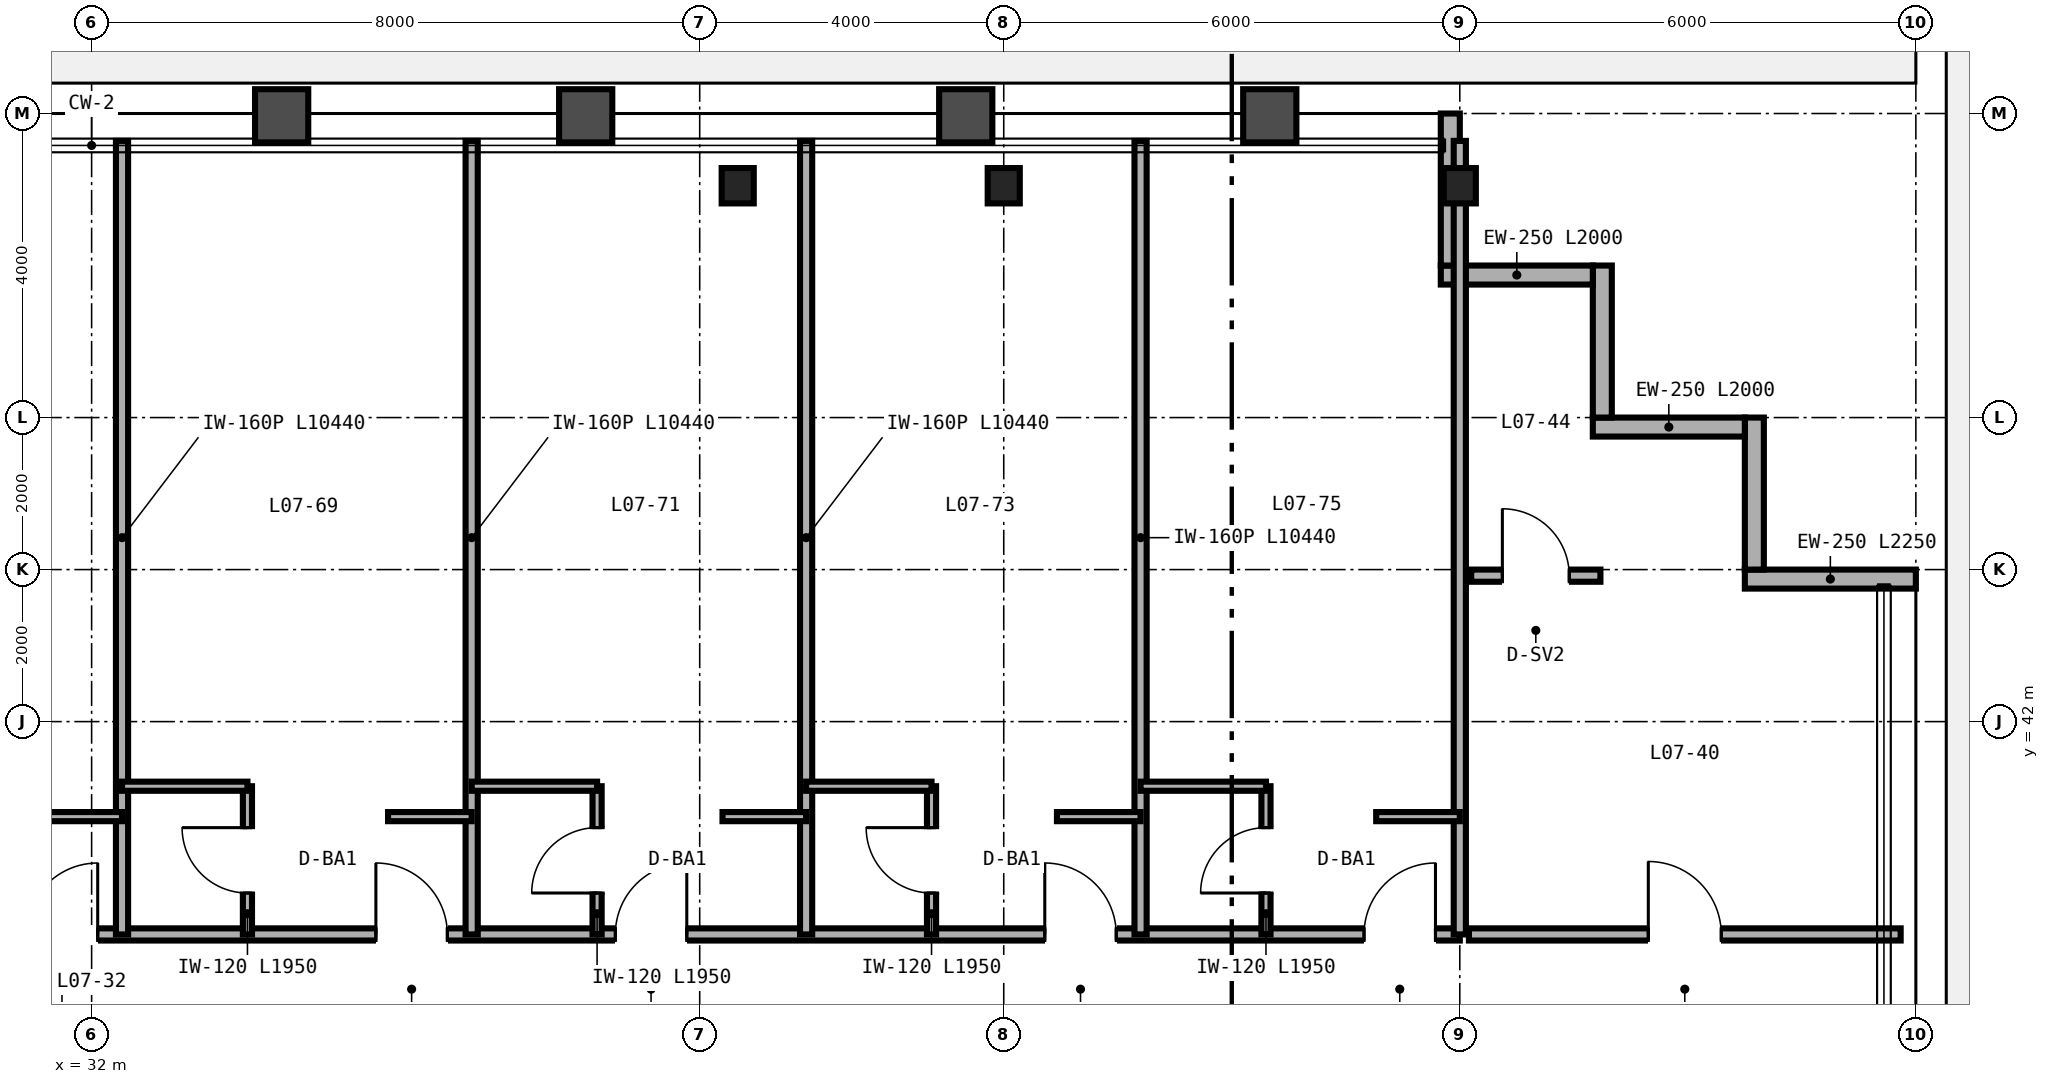
"""IFC4 building model, lengths in metres.
Left out: names, types, materials, properties, quantities, classifications, styles, units other than length and angle.
Written with IfcOpenShell. Run it as: python <this file> out.ifc"""

import sys

from ifc_helpers import new_model, si_unit, direction, frame, frame_2d, origin, origin_2d, place, context, subcontext, project, spatial, rectangle, i_section, extrude, source, transform, mapped, element, fill, save


model = new_model("IFC4")
c1 = context("Model", 3, precision=1e-05, world=origin(), true_north=direction((0.0, 1.0)))
c2 = subcontext(c1, "Body", "Model", "MODEL_VIEW")
j1 = project(units=[si_unit("LENGTHUNIT", "METRE"), si_unit("PLANEANGLEUNIT", "RADIAN")], contexts=[c1])
p1 = place(None, origin())
s1 = spatial("IfcSite", under=j1, at=p1, CompositionType="ELEMENT")
p2 = place(p1, origin())
s2 = spatial("IfcBuilding", under=s1, at=p2, CompositionType="ELEMENT")
p3 = place(p2, frame((0.0, 0.0, 34.8)))
s3 = spatial("IfcBuildingStorey", under=s2, at=p3, CompositionType="ELEMENT", Elevation=34.8)
m1 = source(origin(), c2, "Body", "SweptSolid", [
    extrude(i_section(OverallWidth=0.422, OverallDepth=0.465, WebThickness=0.045, FlangeThickness=0.073, FilletRadius=0.025, at=origin_2d()), origin(), (0.0, 0.0, 1.0), 3.35),
])
for number, where, z_axis, x_axis in (
    (1, (40.5, 49.05, 0.0), (0.0, 0.0, 1.0), (1.0, 0.0, 0.0)),
    (2, (44.0, 49.05, 0.0), (0.0, 0.0, 1.0), (1.0, 0.0, 0.0)),
    (3, (50.0, 49.05, 0.0), (0.0, 0.0, 1.0), (1.0, 0.0, 0.0)),
):
    element("IfcColumn", number, at=place(p3, frame(where, z_axis=z_axis, x_axis=x_axis)), inside=s3, PredefinedType="COLUMN", context=c2, shape_type="MappedRepresentation", body=[
        mapped(m1, transform((0.0, 0.0, 0.0), scale=1.0)),
    ])
p4 = place(p3, frame((56.0, 43.875, 0.0), z_axis=(0.0, 0.0, 1.0), x_axis=(-1.0, 0.0, 0.0)))
e4 = element("IfcWall", 4, at=p4, inside=s3, PredefinedType="SOLIDWALL", context=c2, shape_type="SweptSolid", body=[
    extrude(rectangle(XDim=2.25, YDim=0.25, at=frame_2d((1.125, 0.0))), origin(), (0.0, 0.0, 1.0), 3.35),
])
for number, where, z_axis, x_axis in (
    (5, (53.875, 44.0, 0.0), (0.0, 0.0, 1.0), (0.0, 1.0, 0.0)),
    (6, (53.75, 45.875, 0.0), (0.0, 0.0, 1.0), (-1.0, 0.0, 0.0)),
    (7, (51.875, 46.0, 0.0), (0.0, 0.0, 1.0), (0.0, 1.0, 0.0)),
    (8, (51.75, 47.875, 0.0), (0.0, 0.0, 1.0), (-1.0, 0.0, 0.0)),
):
    element("IfcWall", number, at=place(p3, frame(where, z_axis=z_axis, x_axis=x_axis)), inside=s3, PredefinedType="SOLIDWALL", context=c2, shape_type="SweptSolid", body=[
        extrude(rectangle(XDim=2.0, YDim=0.25, at=frame_2d((1.0, 0.0))), origin(), (0.0, 0.0, 1.0), 3.35),
    ])
p5 = place(p3, frame((49.875, 48.0, 0.0), z_axis=(0.0, 0.0, 1.0), x_axis=(0.0, 1.0, 0.0)))
e9 = element("IfcWall", 9, at=p5, inside=s3, PredefinedType="SOLIDWALL", context=c2, shape_type="SweptSolid", body=[
    extrude(rectangle(XDim=2.0, YDim=0.25, at=frame_2d((1.0, 0.0))), origin(), (0.0, 0.0, 1.0), 2.657),
])
p6 = place(p3, frame((50.12, 39.2, 0.0), z_axis=(0.0, 0.0, 1.0), x_axis=(1.0, 0.0, 0.0)))
e10 = element("IfcWall", 10, at=p6, inside=s3, PredefinedType="PARTITIONING", context=c2, shape_type="SweptSolid", body=[
    extrude(rectangle(XDim=5.68, YDim=0.16, at=frame_2d((2.84, 0.0))), origin(), (0.0, 0.0, 1.0), 3.35),
])
p7 = place(p6, frame((2.36, 0.0, 0.0)))
e11 = element("IfcOpeningElement", 11, at=p7, cuts=e10, PredefinedType="OPENING", context=c2, shape_type="SweptSolid", body=[
    extrude(rectangle(XDim=0.96, YDim=2.15, at=frame_2d((0.48, 1.075))), frame((0.0, 0.09, 0.0), z_axis=(0.0, -1.0, 0.0), x_axis=(1.0, 0.0, 0.0)), (0.0, 0.0, 1.0), 0.18),
])
p8 = place(p3, frame((50.15, 43.92, 0.0), z_axis=(0.0, 0.0, 1.0), x_axis=(1.0, 0.0, 0.0)))
e12 = element("IfcWall", 12, at=p8, inside=s3, PredefinedType="PARTITIONING", context=c2, shape_type="SweptSolid", body=[
    extrude(rectangle(XDim=1.7, YDim=0.16, at=frame_2d((0.85, 0.0))), origin(), (0.0, 0.0, 1.0), 3.35),
])
p9 = place(p8, frame((0.41, 0.0, 0.0)))
e13 = element("IfcOpeningElement", 13, at=p9, cuts=e12, PredefinedType="OPENING", context=c2, shape_type="SweptSolid", body=[
    extrude(rectangle(XDim=0.88, YDim=2.15, at=frame_2d((0.44, 1.075))), frame((0.0, 0.09, 0.0), z_axis=(0.0, -1.0, 0.0), x_axis=(1.0, 0.0, 0.0)), (0.0, 0.0, 1.0), 0.18),
])
p10 = place(p3, frame((14.0, 39.2, 0.0), z_axis=(0.0, 0.0, 1.0), x_axis=(1.0, 0.0, 0.0)))
e14 = element("IfcWall", 14, at=p10, inside=s3, PredefinedType="PARTITIONING", context=c2, shape_type="SweptSolid", body=[
    extrude(rectangle(XDim=36.0, YDim=0.16, at=frame_2d((18.0, 0.0))), origin(), (0.0, 0.0, 1.0), 2.571),
])
p11 = place(p10, frame((3.34, 0.0, 0.0)))
e15 = element("IfcOpeningElement", 15, at=p11, cuts=e14, PredefinedType="OPENING", context=c2, shape_type="SweptSolid", body=[
    extrude(rectangle(XDim=0.94, YDim=2.15, at=frame_2d((0.47, 1.075))), frame((0.0, 0.09, 0.0), z_axis=(0.0, -1.0, 0.0), x_axis=(1.0, 0.0, 0.0)), (0.0, 0.0, 1.0), 0.18),
])
p12 = place(p10, frame((7.79, 0.0, 0.0)))
e16 = element("IfcOpeningElement", 16, at=p12, cuts=e14, PredefinedType="OPENING", context=c2, shape_type="SweptSolid", body=[
    extrude(rectangle(XDim=0.94, YDim=2.15, at=frame_2d((0.47, 1.075))), frame((0.0, 0.09, 0.0), z_axis=(0.0, -1.0, 0.0), x_axis=(1.0, 0.0, 0.0)), (0.0, 0.0, 1.0), 0.18),
])
p13 = place(p10, frame((12.54, 0.0, 0.0)))
e17 = element("IfcOpeningElement", 17, at=p13, cuts=e14, PredefinedType="OPENING", context=c2, shape_type="SweptSolid", body=[
    extrude(rectangle(XDim=0.94, YDim=2.15, at=frame_2d((0.47, 1.075))), frame((0.0, 0.09, 0.0), z_axis=(0.0, -1.0, 0.0), x_axis=(1.0, 0.0, 0.0)), (0.0, 0.0, 1.0), 0.18),
])
p14 = place(p10, frame((17.14, 0.0, 0.0)))
e18 = element("IfcOpeningElement", 18, at=p14, cuts=e14, PredefinedType="OPENING", context=c2, shape_type="SweptSolid", body=[
    extrude(rectangle(XDim=0.94, YDim=2.15, at=frame_2d((0.47, 1.075))), frame((0.0, 0.09, 0.0), z_axis=(0.0, -1.0, 0.0), x_axis=(1.0, 0.0, 0.0)), (0.0, 0.0, 1.0), 0.18),
])
p15 = place(p10, frame((21.74, 0.0, 0.0)))
e19 = element("IfcOpeningElement", 19, at=p15, cuts=e14, PredefinedType="OPENING", context=c2, shape_type="SweptSolid", body=[
    extrude(rectangle(XDim=0.94, YDim=2.15, at=frame_2d((0.47, 1.075))), frame((0.0, 0.09, 0.0), z_axis=(0.0, -1.0, 0.0), x_axis=(1.0, 0.0, 0.0)), (0.0, 0.0, 1.0), 0.18),
])
p16 = place(p10, frame((24.89, 0.0, 0.0)))
e20 = element("IfcOpeningElement", 20, at=p16, cuts=e14, PredefinedType="OPENING", context=c2, shape_type="SweptSolid", body=[
    extrude(rectangle(XDim=0.94, YDim=2.15, at=frame_2d((0.47, 1.075))), frame((0.0, 0.09, 0.0), z_axis=(0.0, -1.0, 0.0), x_axis=(1.0, 0.0, 0.0)), (0.0, 0.0, 1.0), 0.18),
])
p17 = place(p10, frame((30.54, 0.0, 0.0)))
e21 = element("IfcOpeningElement", 21, at=p17, cuts=e14, PredefinedType="OPENING", context=c2, shape_type="SweptSolid", body=[
    extrude(rectangle(XDim=0.94, YDim=2.15, at=frame_2d((0.47, 1.075))), frame((0.0, 0.09, 0.0), z_axis=(0.0, -1.0, 0.0), x_axis=(1.0, 0.0, 0.0)), (0.0, 0.0, 1.0), 0.18),
])
p18 = place(p10, frame((34.74, 0.0, 0.0)))
e22 = element("IfcOpeningElement", 22, at=p18, cuts=e14, PredefinedType="OPENING", context=c2, shape_type="SweptSolid", body=[
    extrude(rectangle(XDim=0.94, YDim=2.15, at=frame_2d((0.47, 1.075))), frame((0.0, 0.09, 0.0), z_axis=(0.0, -1.0, 0.0), x_axis=(1.0, 0.0, 0.0)), (0.0, 0.0, 1.0), 0.18),
])
p19 = place(p3, frame((50.0, 39.2, 0.0), z_axis=(0.0, 0.0, 1.0), x_axis=(0.0, 1.0, 0.0)))
e23 = element("IfcWall", 23, at=p19, inside=s3, PredefinedType="PARTITIONING", context=c2, shape_type="SweptSolid", body=[
    extrude(rectangle(XDim=10.44, YDim=0.16, at=frame_2d((5.22, 0.0))), origin(), (0.0, 0.0, 1.0), 2.657),
])
p20 = place(p3, frame((32.4, 39.2, 0.0), z_axis=(0.0, 0.0, 1.0), x_axis=(0.0, 1.0, 0.0)))
e24 = element("IfcWall", 24, at=p20, inside=s3, PredefinedType="PARTITIONING", context=c2, shape_type="SweptSolid", body=[
    extrude(rectangle(XDim=10.44, YDim=0.16, at=frame_2d((5.22, 0.0))), origin(), (0.0, 0.0, 1.0), 2.423),
])
p21 = place(p3, frame((31.3, 40.75, 0.0), z_axis=(0.0, 0.0, 1.0), x_axis=(1.0, 0.0, 0.0)))
e25 = element("IfcWall", 25, at=p21, inside=s3, PredefinedType="PARTITIONING", context=c2, shape_type="SweptSolid", body=[
    extrude(rectangle(XDim=1.1, YDim=0.12, at=frame_2d((0.55, 0.0))), origin(), (0.0, 0.0, 1.0), 3.35),
])
p22 = place(p3, frame((37.0, 39.2, 0.0), z_axis=(0.0, 0.0, 1.0), x_axis=(0.0, 1.0, 0.0)))
e26 = element("IfcWall", 26, at=p22, inside=s3, PredefinedType="PARTITIONING", context=c2, shape_type="SweptSolid", body=[
    extrude(rectangle(XDim=10.44, YDim=0.16, at=frame_2d((5.22, 0.0))), origin(), (0.0, 0.0, 1.0), 2.423),
])
p23 = place(p3, frame((34.05, 39.2, 0.0), z_axis=(0.0, 0.0, 1.0), x_axis=(0.0, 1.0, 0.0)))
e27 = element("IfcWall", 27, at=p23, inside=s3, PredefinedType="PARTITIONING", context=c2, shape_type="SweptSolid", body=[
    extrude(rectangle(XDim=1.95, YDim=0.12, at=frame_2d((0.975, 0.0))), origin(), (0.0, 0.0, 1.0), 3.35),
])
p24 = place(p23, frame((0.545, 0.0, 0.0)))
e28 = element("IfcOpeningElement", 28, at=p24, cuts=e27, PredefinedType="OPENING", context=c2, shape_type="SweptSolid", body=[
    extrude(rectangle(XDim=0.86, YDim=2.1, at=frame_2d((0.43, 1.05))), frame((0.0, 0.07, 0.0), z_axis=(0.0, -1.0, 0.0), x_axis=(1.0, 0.0, 0.0)), (0.0, 0.0, 1.0), 0.14),
])
p25 = place(p3, frame((32.4, 41.15, 0.0), z_axis=(0.0, 0.0, 1.0), x_axis=(1.0, 0.0, 0.0)))
e29 = element("IfcWall", 29, at=p25, inside=s3, PredefinedType="PARTITIONING", context=c2, shape_type="SweptSolid", body=[
    extrude(rectangle(XDim=1.65, YDim=0.12, at=frame_2d((0.825, 0.0))), origin(), (0.0, 0.0, 1.0), 3.35),
])
p26 = place(p3, frame((35.9, 40.75, 0.0), z_axis=(0.0, 0.0, 1.0), x_axis=(1.0, 0.0, 0.0)))
e30 = element("IfcWall", 30, at=p26, inside=s3, PredefinedType="PARTITIONING", context=c2, shape_type="SweptSolid", body=[
    extrude(rectangle(XDim=1.1, YDim=0.12, at=frame_2d((0.55, 0.0))), origin(), (0.0, 0.0, 1.0), 3.35),
])
p27 = place(p3, frame((41.4, 39.2, 0.0), z_axis=(0.0, 0.0, 1.0), x_axis=(0.0, 1.0, 0.0)))
e31 = element("IfcWall", 31, at=p27, inside=s3, PredefinedType="PARTITIONING", context=c2, shape_type="SweptSolid", body=[
    extrude(rectangle(XDim=10.44, YDim=0.16, at=frame_2d((5.22, 0.0))), origin(), (0.0, 0.0, 1.0), 2.813),
])
p28 = place(p3, frame((38.65, 39.2, 0.0), z_axis=(0.0, 0.0, 1.0), x_axis=(0.0, 1.0, 0.0)))
e32 = element("IfcWall", 32, at=p28, inside=s3, PredefinedType="PARTITIONING", context=c2, shape_type="SweptSolid", body=[
    extrude(rectangle(XDim=1.95, YDim=0.12, at=frame_2d((0.975, 0.0))), origin(), (0.0, 0.0, 1.0), 3.35),
])
p29 = place(p28, frame((0.545, 0.0, 0.0)))
e33 = element("IfcOpeningElement", 33, at=p29, cuts=e32, PredefinedType="OPENING", context=c2, shape_type="SweptSolid", body=[
    extrude(rectangle(XDim=0.86, YDim=2.1, at=frame_2d((0.43, 1.05))), frame((0.0, 0.07, 0.0), z_axis=(0.0, -1.0, 0.0), x_axis=(1.0, 0.0, 0.0)), (0.0, 0.0, 1.0), 0.14),
])
p30 = place(p3, frame((37.0, 41.15, 0.0), z_axis=(0.0, 0.0, 1.0), x_axis=(1.0, 0.0, 0.0)))
e34 = element("IfcWall", 34, at=p30, inside=s3, PredefinedType="PARTITIONING", context=c2, shape_type="SweptSolid", body=[
    extrude(rectangle(XDim=1.65, YDim=0.12, at=frame_2d((0.825, 0.0))), origin(), (0.0, 0.0, 1.0), 3.35),
])
p31 = place(p3, frame((40.3, 40.75, 0.0), z_axis=(0.0, 0.0, 1.0), x_axis=(1.0, 0.0, 0.0)))
e35 = element("IfcWall", 35, at=p31, inside=s3, PredefinedType="PARTITIONING", context=c2, shape_type="SweptSolid", body=[
    extrude(rectangle(XDim=1.1, YDim=0.12, at=frame_2d((0.55, 0.0))), origin(), (0.0, 0.0, 1.0), 2.571),
])
p32 = place(p3, frame((45.8, 39.2, 0.0), z_axis=(0.0, 0.0, 1.0), x_axis=(0.0, 1.0, 0.0)))
e36 = element("IfcWall", 36, at=p32, inside=s3, PredefinedType="PARTITIONING", context=c2, shape_type="SweptSolid", body=[
    extrude(rectangle(XDim=10.44, YDim=0.16, at=frame_2d((5.22, 0.0))), origin(), (0.0, 0.0, 1.0), 2.657),
])
p33 = place(p3, frame((43.05, 39.2, 0.0), z_axis=(0.0, 0.0, 1.0), x_axis=(0.0, 1.0, 0.0)))
e37 = element("IfcWall", 37, at=p33, inside=s3, PredefinedType="PARTITIONING", context=c2, shape_type="SweptSolid", body=[
    extrude(rectangle(XDim=1.95, YDim=0.12, at=frame_2d((0.975, 0.0))), origin(), (0.0, 0.0, 1.0), 3.35),
])
p34 = place(p33, frame((0.545, 0.0, 0.0)))
e38 = element("IfcOpeningElement", 38, at=p34, cuts=e37, PredefinedType="OPENING", context=c2, shape_type="SweptSolid", body=[
    extrude(rectangle(XDim=0.86, YDim=2.1, at=frame_2d((0.43, 1.05))), frame((0.0, 0.07, 0.0), z_axis=(0.0, -1.0, 0.0), x_axis=(1.0, 0.0, 0.0)), (0.0, 0.0, 1.0), 0.14),
])
p35 = place(p3, frame((41.4, 41.15, 0.0), z_axis=(0.0, 0.0, 1.0), x_axis=(1.0, 0.0, 0.0)))
e39 = element("IfcWall", 39, at=p35, inside=s3, PredefinedType="PARTITIONING", context=c2, shape_type="SweptSolid", body=[
    extrude(rectangle(XDim=1.65, YDim=0.12, at=frame_2d((0.825, 0.0))), origin(), (0.0, 0.0, 1.0), 3.35),
])
p36 = place(p3, frame((44.7, 40.75, 0.0), z_axis=(0.0, 0.0, 1.0), x_axis=(1.0, 0.0, 0.0)))
e40 = element("IfcWall", 40, at=p36, inside=s3, PredefinedType="PARTITIONING", context=c2, shape_type="SweptSolid", body=[
    extrude(rectangle(XDim=1.1, YDim=0.12, at=frame_2d((0.55, 0.0))), origin(), (0.0, 0.0, 1.0), 3.35),
])
p37 = place(p3, frame((47.45, 39.2, 0.0), z_axis=(0.0, 0.0, 1.0), x_axis=(0.0, 1.0, 0.0)))
e41 = element("IfcWall", 41, at=p37, inside=s3, PredefinedType="PARTITIONING", context=c2, shape_type="SweptSolid", body=[
    extrude(rectangle(XDim=1.95, YDim=0.12, at=frame_2d((0.975, 0.0))), origin(), (0.0, 0.0, 1.0), 3.35),
])
p38 = place(p37, frame((0.545, 0.0, 0.0)))
e42 = element("IfcOpeningElement", 42, at=p38, cuts=e41, PredefinedType="OPENING", context=c2, shape_type="SweptSolid", body=[
    extrude(rectangle(XDim=0.86, YDim=2.1, at=frame_2d((0.43, 1.05))), frame((0.0, 0.07, 0.0), z_axis=(0.0, -1.0, 0.0), x_axis=(1.0, 0.0, 0.0)), (0.0, 0.0, 1.0), 0.14),
])
p39 = place(p3, frame((45.8, 41.15, 0.0), z_axis=(0.0, 0.0, 1.0), x_axis=(1.0, 0.0, 0.0)))
e43 = element("IfcWall", 43, at=p39, inside=s3, PredefinedType="PARTITIONING", context=c2, shape_type="SweptSolid", body=[
    extrude(rectangle(XDim=1.65, YDim=0.12, at=frame_2d((0.825, 0.0))), origin(), (0.0, 0.0, 1.0), 3.35),
])
p40 = place(p3, frame((48.9, 40.75, 0.0), z_axis=(0.0, 0.0, 1.0), x_axis=(1.0, 0.0, 0.0)))
e44 = element("IfcWall", 44, at=p40, inside=s3, PredefinedType="PARTITIONING", context=c2, shape_type="SweptSolid", body=[
    extrude(rectangle(XDim=1.1, YDim=0.12, at=frame_2d((0.55, 0.0))), origin(), (0.0, 0.0, 1.0), 3.35),
])
m2 = source(origin(), c2, "Body", "SweptSolid", [
    extrude(rectangle(XDim=0.96, YDim=2.15, at=frame_2d((0.48, 1.075))), frame((0.0, 0.025, 0.0), z_axis=(0.0, -1.0, 0.0), x_axis=(1.0, 0.0, 0.0)), (0.0, 0.0, 1.0), 0.05),
])
p41 = place(p7, origin())
e45 = element("IfcDoor", 45, at=p41, inside=s3, OperationType="SINGLE_SWING_LEFT", PredefinedType="DOOR", context=c2, shape_type="MappedRepresentation", body=[
    mapped(m2, transform((0.0, 0.0, 0.0), scale=1.0)),
])
fill(e11, e45)
m3 = source(origin(), c2, "Body", "SweptSolid", [
    extrude(rectangle(XDim=0.88, YDim=2.15, at=frame_2d((0.44, 1.075))), frame((0.0, 0.025, 0.0), z_axis=(0.0, -1.0, 0.0), x_axis=(1.0, 0.0, 0.0)), (0.0, 0.0, 1.0), 0.05),
])
p42 = place(p9, origin())
e46 = element("IfcDoor", 46, at=p42, inside=s3, OperationType="SINGLE_SWING_LEFT", PredefinedType="DOOR", context=c2, shape_type="MappedRepresentation", body=[
    mapped(m3, transform((0.0, 0.0, 0.0), scale=1.0)),
])
fill(e13, e46)
m4 = source(origin(), c2, "Body", "SweptSolid", [
    extrude(rectangle(XDim=0.86, YDim=2.1, at=frame_2d((0.43, 1.05))), frame((0.0, 0.025, 0.0), z_axis=(0.0, -1.0, 0.0), x_axis=(1.0, 0.0, 0.0)), (0.0, 0.0, 1.0), 0.05),
])
p43 = place(p24, origin())
e47 = element("IfcDoor", 47, at=p43, inside=s3, OperationType="SINGLE_SWING_RIGHT", PredefinedType="DOOR", context=c2, shape_type="MappedRepresentation", body=[
    mapped(m4, transform((0.0, 0.0, 0.0), scale=1.0)),
])
fill(e28, e47)
p44 = place(p29, origin())
e48 = element("IfcDoor", 48, at=p44, inside=s3, OperationType="SINGLE_SWING_LEFT", PredefinedType="DOOR", context=c2, shape_type="MappedRepresentation", body=[
    mapped(m4, transform((0.0, 0.0, 0.0), scale=1.0)),
])
fill(e33, e48)
p45 = place(p34, origin())
e49 = element("IfcDoor", 49, at=p45, inside=s3, OperationType="SINGLE_SWING_RIGHT", PredefinedType="DOOR", context=c2, shape_type="MappedRepresentation", body=[
    mapped(m4, transform((0.0, 0.0, 0.0), scale=1.0)),
])
fill(e38, e49)
p46 = place(p38, origin())
e50 = element("IfcDoor", 50, at=p46, inside=s3, OperationType="SINGLE_SWING_LEFT", PredefinedType="DOOR", context=c2, shape_type="MappedRepresentation", body=[
    mapped(m4, transform((0.0, 0.0, 0.0), scale=1.0)),
])
fill(e42, e50)
m5 = source(origin(), c2, "Body", "SweptSolid", [
    extrude(rectangle(XDim=0.94, YDim=2.15, at=frame_2d((0.47, 1.075))), frame((0.0, 0.025, 0.0), z_axis=(0.0, -1.0, 0.0), x_axis=(1.0, 0.0, 0.0)), (0.0, 0.0, 1.0), 0.05),
])
p47 = place(p14, origin())
e51 = element("IfcDoor", 51, at=p47, inside=s3, OperationType="SINGLE_SWING_RIGHT", PredefinedType="DOOR", context=c2, shape_type="MappedRepresentation", body=[
    mapped(m5, transform((0.0, 0.0, 0.0), scale=1.0)),
])
fill(e18, e51)
p48 = place(p15, origin())
e52 = element("IfcDoor", 52, at=p48, inside=s3, OperationType="SINGLE_SWING_LEFT", PredefinedType="DOOR", context=c2, shape_type="MappedRepresentation", body=[
    mapped(m5, transform((0.0, 0.0, 0.0), scale=1.0)),
])
fill(e19, e52)
p49 = place(p16, origin())
e53 = element("IfcDoor", 53, at=p49, inside=s3, OperationType="SINGLE_SWING_RIGHT", PredefinedType="DOOR", context=c2, shape_type="MappedRepresentation", body=[
    mapped(m5, transform((0.0, 0.0, 0.0), scale=1.0)),
])
fill(e20, e53)
p50 = place(p17, origin())
e54 = element("IfcDoor", 54, at=p50, inside=s3, OperationType="SINGLE_SWING_LEFT", PredefinedType="DOOR", context=c2, shape_type="MappedRepresentation", body=[
    mapped(m5, transform((0.0, 0.0, 0.0), scale=1.0)),
])
fill(e21, e54)
p51 = place(p18, origin())
e55 = element("IfcDoor", 55, at=p51, inside=s3, OperationType="SINGLE_SWING_RIGHT", PredefinedType="DOOR", context=c2, shape_type="MappedRepresentation", body=[
    mapped(m5, transform((0.0, 0.0, 0.0), scale=1.0)),
])
fill(e22, e55)
save(model, sys.argv[1])
